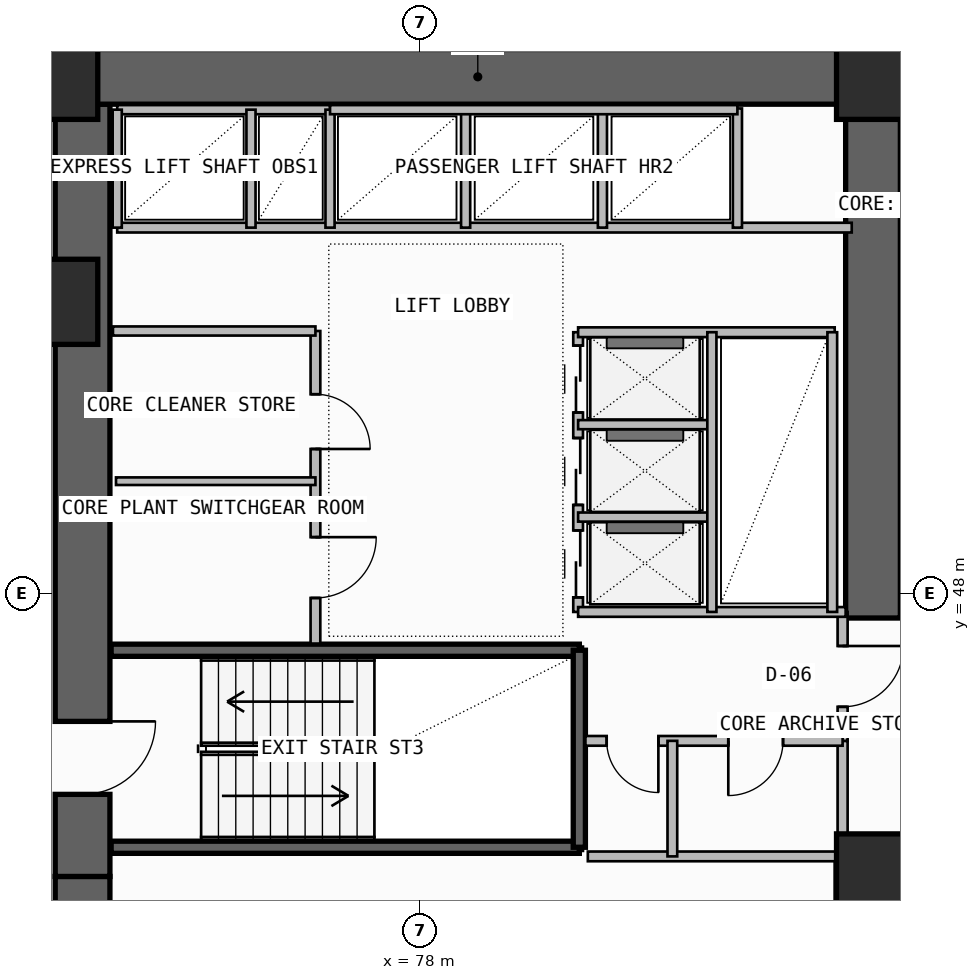
"""IFC4 building model, lengths in metres.
Left out: names, types, materials, properties, quantities, classifications, styles, units other than length and angle.
Written with IfcOpenShell. Run it as: python <this file> out.ifc"""

import sys

from ifc_helpers import new_model, si_unit, direction, frame, frame_2d, origin, origin_2d, place, context, subcontext, project, spatial, rectangle, extrude, element, fill, save


model = new_model("IFC4")
c1 = context("Model", 3, precision=1e-05, world=origin(), true_north=direction((0.0, 1.0)))
c2 = subcontext(c1, "Body", "Model", "MODEL_VIEW")
j1 = project(units=[si_unit("LENGTHUNIT", "METRE"), si_unit("PLANEANGLEUNIT", "RADIAN")], contexts=[c1])
p1 = place(None, origin())
s1 = spatial("IfcSite", under=j1, at=p1, CompositionType="ELEMENT")
p2 = place(p1, origin())
s2 = spatial("IfcBuilding", under=s1, at=p2, CompositionType="ELEMENT")
p3 = place(p2, frame((0.0, 0.0, 150.3)))
s3 = spatial("IfcBuildingStorey", under=s2, at=p3, CompositionType="ELEMENT", Elevation=150.3)
p4 = place(p3, frame((72.45, 35.5, -0.26), z_axis=(0.0, 0.0, 1.0), x_axis=(0.0, 1.0, 0.0)))
e1 = element("IfcWall", 1, at=p4, inside=s3, PredefinedType="SHEAR", context=c2, shape_type="SweptSolid", body=[
    extrude(rectangle(XDim=7.85, YDim=0.9, at=frame_2d((3.925, 0.0))), origin(), (0.0, 0.0, 1.0), 3.6),
])
p5 = place(p4, frame((1.45, 0.0, 0.26)))
e2 = element("IfcOpeningElement", 2, at=p5, cuts=e1, PredefinedType="OPENING", context=c2, shape_type="SweptSolid", body=[
    extrude(rectangle(XDim=1.2, YDim=2.2, at=frame_2d((0.6, 1.1))), frame((0.0, 0.46, 0.0), z_axis=(0.0, -1.0, 0.0), x_axis=(1.0, 0.0, 0.0)), (0.0, 0.0, 1.0), 0.92),
])
p6 = place(p3, frame((72.45, 43.35, -0.26), z_axis=(0.0, 0.0, 1.0), x_axis=(0.0, 1.0, 0.0)))
e3 = element("IfcWall", 3, at=p6, inside=s3, PredefinedType="SHEAR", context=c2, shape_type="SweptSolid", body=[
    extrude(rectangle(XDim=12.7, YDim=0.9, at=frame_2d((6.35, 0.0))), origin(), (0.0, 0.0, 1.0), 3.6),
])
p7 = place(p6, frame((1.35, 0.0, 0.26)))
e4 = element("IfcOpeningElement", 4, at=p7, cuts=e3, PredefinedType="OPENING", context=c2, shape_type="SweptSolid", body=[
    extrude(rectangle(XDim=1.2, YDim=2.2, at=frame_2d((0.6, 1.1))), frame((0.0, 0.46, 0.0), z_axis=(0.0, -1.0, 0.0), x_axis=(1.0, 0.0, 0.0)), (0.0, 0.0, 1.0), 0.92),
])
p8 = place(p3, frame((72.0, 56.5, -0.26), z_axis=(0.0, 0.0, 1.0), x_axis=(1.0, 0.0, 0.0)))
e5 = element("IfcWall", 5, at=p8, inside=s3, PredefinedType="SHEAR", context=c2, shape_type="SweptSolid", body=[
    extrude(rectangle(XDim=13.9, YDim=0.9, at=frame_2d((6.95, 0.0))), origin(), (0.0, 0.0, 1.0), 3.6),
])
p9 = place(p3, frame((85.45, 47.6, -0.26), z_axis=(0.0, 0.0, 1.0), x_axis=(0.0, 1.0, 0.0)))
e6 = element("IfcWall", 6, at=p9, inside=s3, PredefinedType="SHEAR", context=c2, shape_type="SweptSolid", body=[
    extrude(rectangle(XDim=8.45, YDim=0.9, at=frame_2d((4.225, 0.0))), origin(), (0.0, 0.0, 1.0), 3.6),
])
for number, where, z_axis, x_axis in (
    (7, (85.55, 43.35, 0.0), (0.0, 0.0, 1.0), (1.0, 0.0, 0.0)),
    (8, (72.0, 52.8, 0.0), (0.0, 0.0, 1.0), (1.0, 0.0, 0.0)),
    (9, (72.0, 56.5, 0.0), (0.0, 0.0, 1.0), (1.0, 0.0, 0.0)),
    (10, (85.55, 56.5, 0.0), (0.0, 0.0, 1.0), (1.0, 0.0, 0.0)),
):
    element("IfcColumn", number, at=place(p3, frame(where, z_axis=z_axis, x_axis=x_axis)), inside=s3, PredefinedType="COLUMN", context=c2, shape_type="SweptSolid", body=[
        extrude(rectangle(XDim=1.4, YDim=1.4, at=origin_2d()), origin(), (0.0, 0.0, 1.0), 3.6),
    ])
p10 = place(p3, frame((84.92, 38.85, 0.0), z_axis=(0.0, 0.0, 1.0), x_axis=(0.0, 1.0, 0.0)))
e11 = element("IfcWall", 11, at=p10, inside=s3, PredefinedType="SOLIDWALL", context=c2, shape_type="SweptSolid", body=[
    extrude(rectangle(XDim=4.83, YDim=0.2, at=frame_2d((2.415, 0.0))), origin(), (0.0, 0.0, 1.0), 3.34),
])
p11 = place(p10, frame((1.25, 0.0, 0.0)))
e12 = element("IfcOpeningElement", 12, at=p11, cuts=e11, PredefinedType="OPENING", context=c2, shape_type="SweptSolid", body=[
    extrude(rectangle(XDim=1.1, YDim=2.2, at=frame_2d((0.55, 1.1))), frame((0.0, 0.11, 0.0), z_axis=(0.0, -1.0, 0.0), x_axis=(1.0, 0.0, 0.0)), (0.0, 0.0, 1.0), 0.22),
])
for number, where, z_axis, x_axis in (
    (13, (72.92, 43.83, -0.26), (0.0, 0.0, 1.0), (1.0, 0.0, 0.0)),
    (14, (72.92, 47.07, -0.26), (0.0, 0.0, 1.0), (1.0, 0.0, 0.0)),
):
    element("IfcWall", number, at=place(p3, frame(where, z_axis=z_axis, x_axis=x_axis)), inside=s3, PredefinedType="SOLIDWALL", context=c2, shape_type="SweptSolid", body=[
        extrude(rectangle(XDim=7.7, YDim=0.2, at=frame_2d((3.85, 0.0))), origin(), (0.0, 0.0, 1.0), 3.6),
    ])
p12 = place(p3, frame((80.62, 43.83, -0.26), z_axis=(0.0, 0.0, 1.0), x_axis=(0.0, 1.0, 0.0)))
e15 = element("IfcWall", 15, at=p12, inside=s3, PredefinedType="SOLIDWALL", context=c2, shape_type="SweptSolid", body=[
    extrude(rectangle(XDim=3.24, YDim=0.2, at=frame_2d((1.62, 0.0))), origin(), (0.0, 0.0, 1.0), 3.6),
])
p13 = place(p3, frame((84.95, 43.68, 0.0), z_axis=(0.0, 0.0, 1.0), x_axis=(0.0, 1.0, 0.0)))
e16 = element("IfcWall", 16, at=p13, inside=s3, PredefinedType="PLUMBINGWALL", context=c2, shape_type="SweptSolid", body=[
    extrude(rectangle(XDim=1.9, YDim=0.165, at=frame_2d((0.95, 0.0))), origin(), (0.0, 0.0, 1.0), 3.34),
])
p14 = place(p3, frame((84.95, 45.58, 0.0), z_axis=(0.0, 0.0, 1.0), x_axis=(0.0, 1.0, 0.0)))
e17 = element("IfcWall", 17, at=p14, inside=s3, PredefinedType="PARTITIONING", context=c2, shape_type="SweptSolid", body=[
    extrude(rectangle(XDim=2.12, YDim=0.165, at=frame_2d((1.06, 0.0))), origin(), (0.0, 0.0, 1.0), 3.34),
])
p15 = place(p14, frame((0.56, 0.0, 0.0)))
e18 = element("IfcOpeningElement", 18, at=p15, cuts=e17, PredefinedType="OPENING", context=c2, shape_type="SweptSolid", body=[
    extrude(rectangle(XDim=1.0, YDim=2.2, at=frame_2d((0.5, 1.1))), frame((0.0, 0.093, 0.0), z_axis=(0.0, -1.0, 0.0), x_axis=(1.0, 0.0, 0.0)), (0.0, 0.0, 1.0), 0.185),
])
p16 = place(p3, frame((80.72, 45.58, 0.0), z_axis=(0.0, 0.0, 1.0), x_axis=(1.0, 0.0, 0.0)))
e19 = element("IfcWall", 19, at=p16, inside=s3, PredefinedType="PLUMBINGWALL", context=c2, shape_type="SweptSolid", body=[
    extrude(rectangle(XDim=4.23, YDim=0.16, at=frame_2d((2.115, 0.0))), origin(), (0.0, 0.0, 1.0), 3.34),
])
p17 = place(p16, frame((0.35, 0.0, 0.0)))
e20 = element("IfcOpeningElement", 20, at=p17, cuts=e19, PredefinedType="OPENING", context=c2, shape_type="SweptSolid", body=[
    extrude(rectangle(XDim=0.85, YDim=2.05, at=frame_2d((0.425, 1.025))), frame((0.0, 0.09, 0.0), z_axis=(0.0, -1.0, 0.0), x_axis=(1.0, 0.0, 0.0)), (0.0, 0.0, 1.0), 0.18),
])
p18 = place(p16, frame((2.35, 0.0, 0.0)))
e21 = element("IfcOpeningElement", 21, at=p18, cuts=e19, PredefinedType="OPENING", context=c2, shape_type="SweptSolid", body=[
    extrude(rectangle(XDim=0.9, YDim=2.1, at=frame_2d((0.45, 1.05))), frame((0.0, 0.09, 0.0), z_axis=(0.0, -1.0, 0.0), x_axis=(1.0, 0.0, 0.0)), (0.0, 0.0, 1.0), 0.18),
])
p19 = place(p3, frame((80.76, 43.68, 0.0), z_axis=(0.0, 0.0, 1.0), x_axis=(1.0, 0.0, 0.0)))
e22 = element("IfcWall", 22, at=p19, inside=s3, PredefinedType="PLUMBINGWALL", context=c2, shape_type="SweptSolid", body=[
    extrude(rectangle(XDim=4.19, YDim=0.16, at=frame_2d((2.095, 0.0))), origin(), (0.0, 0.0, 1.0), 3.34),
])
p20 = place(p3, frame((82.15, 43.68, 0.0), z_axis=(0.0, 0.0, 1.0), x_axis=(0.0, 1.0, 0.0)))
e23 = element("IfcWall", 23, at=p20, inside=s3, PredefinedType="PLUMBINGWALL", context=c2, shape_type="SweptSolid", body=[
    extrude(rectangle(XDim=1.9, YDim=0.16, at=frame_2d((0.95, 0.0))), origin(), (0.0, 0.0, 1.0), 3.34),
])
p21 = place(p3, frame((76.28, 47.18, 0.0), z_axis=(0.0, 0.0, 1.0), x_axis=(0.0, 1.0, 0.0)))
e24 = element("IfcWall", 24, at=p21, inside=s3, PredefinedType="SOLIDWALL", context=c2, shape_type="SweptSolid", body=[
    extrude(rectangle(XDim=5.14, YDim=0.16, at=frame_2d((2.57, 0.0))), origin(), (0.0, 0.0, 1.0), 3.34),
])
p22 = place(p21, frame((0.75, 0.0, 0.0)))
e25 = element("IfcOpeningElement", 25, at=p22, cuts=e24, PredefinedType="OPENING", context=c2, shape_type="SweptSolid", body=[
    extrude(rectangle(XDim=1.0, YDim=2.2, at=frame_2d((0.5, 1.1))), frame((0.0, 0.09, 0.0), z_axis=(0.0, -1.0, 0.0), x_axis=(1.0, 0.0, 0.0)), (0.0, 0.0, 1.0), 0.18),
])
p23 = place(p21, frame((3.2, 0.0, 0.0)))
e26 = element("IfcOpeningElement", 26, at=p23, cuts=e24, PredefinedType="OPENING", context=c2, shape_type="SweptSolid", body=[
    extrude(rectangle(XDim=0.9, YDim=2.1, at=frame_2d((0.45, 1.05))), frame((0.0, 0.09, 0.0), z_axis=(0.0, -1.0, 0.0), x_axis=(1.0, 0.0, 0.0)), (0.0, 0.0, 1.0), 0.18),
])
p24 = place(p3, frame((72.95, 52.32, 0.0), z_axis=(0.0, 0.0, 1.0), x_axis=(1.0, 0.0, 0.0)))
e27 = element("IfcWall", 27, at=p24, inside=s3, PredefinedType="SOLIDWALL", context=c2, shape_type="SweptSolid", body=[
    extrude(rectangle(XDim=3.33, YDim=0.15, at=frame_2d((1.665, 0.0))), origin(), (0.0, 0.0, 1.0), 3.34),
])
p25 = place(p3, frame((73.0, 49.85, 0.0), z_axis=(0.0, 0.0, 1.0), x_axis=(1.0, 0.0, 0.0)))
e28 = element("IfcWall", 28, at=p25, inside=s3, PredefinedType="PARTITIONING", context=c2, shape_type="SweptSolid", body=[
    extrude(rectangle(XDim=3.28, YDim=0.125, at=frame_2d((1.64, 0.0))), origin(), (0.0, 0.0, 1.0), 3.34),
])
p26 = place(p3, frame((80.6, 47.7, 0.0), z_axis=(0.0, 0.0, 1.0), x_axis=(0.0, 1.0, 0.0)))
e29 = element("IfcWall", 29, at=p26, inside=s3, PredefinedType="SOLIDWALL", context=c2, shape_type="SweptSolid", body=[
    extrude(rectangle(XDim=4.6, YDim=0.16, at=frame_2d((2.3, 0.0))), origin(), (0.0, 0.0, 1.0), 3.34),
])
p27 = place(p26, frame((0.24, 0.0, 0.0)))
e30 = element("IfcOpeningElement", 30, at=p27, cuts=e29, PredefinedType="OPENING", context=c2, shape_type="SweptSolid", body=[
    extrude(rectangle(XDim=1.1, YDim=2.25, at=frame_2d((0.55, 1.125))), frame((0.0, 0.09, 0.0), z_axis=(0.0, -1.0, 0.0), x_axis=(1.0, 0.0, 0.0)), (0.0, 0.0, 1.0), 0.18),
])
p28 = place(p26, frame((1.76, 0.0, 0.0)))
e31 = element("IfcOpeningElement", 31, at=p28, cuts=e29, PredefinedType="OPENING", context=c2, shape_type="SweptSolid", body=[
    extrude(rectangle(XDim=1.1, YDim=2.25, at=frame_2d((0.55, 1.125))), frame((0.0, 0.09, 0.0), z_axis=(0.0, -1.0, 0.0), x_axis=(1.0, 0.0, 0.0)), (0.0, 0.0, 1.0), 0.18),
])
p29 = place(p26, frame((3.28, 0.0, 0.0)))
e32 = element("IfcOpeningElement", 32, at=p29, cuts=e29, PredefinedType="OPENING", context=c2, shape_type="SweptSolid", body=[
    extrude(rectangle(XDim=1.1, YDim=2.25, at=frame_2d((0.55, 1.125))), frame((0.0, 0.09, 0.0), z_axis=(0.0, -1.0, 0.0), x_axis=(1.0, 0.0, 0.0)), (0.0, 0.0, 1.0), 0.18),
])
p30 = place(p3, frame((80.6, 47.7, 0.0), z_axis=(0.0, 0.0, 1.0), x_axis=(1.0, 0.0, 0.0)))
e33 = element("IfcWall", 33, at=p30, inside=s3, PredefinedType="SOLIDWALL", context=c2, shape_type="SweptSolid", body=[
    extrude(rectangle(XDim=4.4, YDim=0.16, at=frame_2d((2.2, 0.0))), origin(), (0.0, 0.0, 1.0), 3.34),
])
p31 = place(p3, frame((80.6, 52.3, 0.0), z_axis=(0.0, 0.0, 1.0), x_axis=(1.0, 0.0, 0.0)))
e34 = element("IfcWall", 34, at=p31, inside=s3, PredefinedType="SOLIDWALL", context=c2, shape_type="SweptSolid", body=[
    extrude(rectangle(XDim=4.22, YDim=0.16, at=frame_2d((2.11, 0.0))), origin(), (0.0, 0.0, 1.0), 3.34),
])
for number, where, z_axis, x_axis in (
    (35, (80.6, 49.26, 0.0), (0.0, 0.0, 1.0), (1.0, 0.0, 0.0)),
    (36, (80.6, 50.78, 0.0), (0.0, 0.0, 1.0), (1.0, 0.0, 0.0)),
):
    element("IfcWall", number, at=place(p3, frame(where, z_axis=z_axis, x_axis=x_axis)), inside=s3, PredefinedType="PLUMBINGWALL", context=c2, shape_type="SweptSolid", body=[
        extrude(rectangle(XDim=2.2, YDim=0.15, at=frame_2d((1.1, 0.0))), origin(), (0.0, 0.0, 1.0), 3.34),
    ])
p32 = place(p3, frame((82.8, 47.7, 0.0), z_axis=(0.0, 0.0, 1.0), x_axis=(0.0, 1.0, 0.0)))
e37 = element("IfcWall", 37, at=p32, inside=s3, PredefinedType="PLUMBINGWALL", context=c2, shape_type="SweptSolid", body=[
    extrude(rectangle(XDim=4.6, YDim=0.15, at=frame_2d((2.3, 0.0))), origin(), (0.0, 0.0, 1.0), 3.34),
])
p33 = place(p3, frame((84.78, 47.7, 0.0), z_axis=(0.0, 0.0, 1.0), x_axis=(0.0, 1.0, 0.0)))
e38 = element("IfcWall", 38, at=p33, inside=s3, PredefinedType="SOLIDWALL", context=c2, shape_type="SweptSolid", body=[
    extrude(rectangle(XDim=4.6, YDim=0.16, at=frame_2d((2.3, 0.0))), origin(), (0.0, 0.0, 1.0), 3.34),
])
p34 = place(p3, frame((73.02, 54.02, 0.0), z_axis=(0.0, 0.0, 1.0), x_axis=(1.0, 0.0, 0.0)))
e39 = element("IfcWall", 39, at=p34, inside=s3, PredefinedType="SOLIDWALL", context=c2, shape_type="SweptSolid", body=[
    extrude(rectangle(XDim=12.08, YDim=0.16, at=frame_2d((6.04, 0.0))), origin(), (0.0, 0.0, 1.0), 3.34),
])
p35 = place(p3, frame((73.02, 55.96, 0.0), z_axis=(0.0, 0.0, 1.0), x_axis=(1.0, 0.0, 0.0)))
e40 = element("IfcWall", 40, at=p35, inside=s3, PredefinedType="SOLIDWALL", context=c2, shape_type="SweptSolid", body=[
    extrude(rectangle(XDim=3.5, YDim=0.15, at=frame_2d((1.75, 0.0))), origin(), (0.0, 0.0, 1.0), 3.34),
])
p36 = place(p3, frame((73.02, 54.02, 0.0), z_axis=(0.0, 0.0, 1.0), x_axis=(0.0, 1.0, 0.0)))
e41 = element("IfcWall", 41, at=p36, inside=s3, PredefinedType="PLUMBINGWALL", context=c2, shape_type="SweptSolid", body=[
    extrude(rectangle(XDim=1.94, YDim=0.15, at=frame_2d((0.97, 0.0))), origin(), (0.0, 0.0, 1.0), 3.34),
])
p37 = place(p3, frame((76.52, 54.02, 0.0), z_axis=(0.0, 0.0, 1.0), x_axis=(0.0, 1.0, 0.0)))
e42 = element("IfcWall", 42, at=p37, inside=s3, PredefinedType="SOLIDWALL", context=c2, shape_type="SweptSolid", body=[
    extrude(rectangle(XDim=1.94, YDim=0.15, at=frame_2d((0.97, 0.0))), origin(), (0.0, 0.0, 1.0), 3.34),
])
p38 = place(p3, frame((75.22, 54.02, 0.0), z_axis=(0.0, 0.0, 1.0), x_axis=(0.0, 1.0, 0.0)))
e43 = element("IfcWall", 43, at=p38, inside=s3, PredefinedType="PLUMBINGWALL", context=c2, shape_type="SweptSolid", body=[
    extrude(rectangle(XDim=1.94, YDim=0.15, at=frame_2d((0.97, 0.0))), origin(), (0.0, 0.0, 1.0), 3.34),
])
for number, where, z_axis, x_axis in (
    (44, (78.75, 54.02, 0.0), (0.0, 0.0, 1.0), (0.0, 1.0, 0.0)),
    (45, (81.0, 54.02, 0.0), (0.0, 0.0, 1.0), (0.0, 1.0, 0.0)),
):
    element("IfcWall", number, at=place(p3, frame(where, z_axis=z_axis, x_axis=x_axis)), inside=s3, PredefinedType="PLUMBINGWALL", context=c2, shape_type="SweptSolid", body=[
        extrude(rectangle(XDim=1.96, YDim=0.15, at=frame_2d((0.98, 0.0))), origin(), (0.0, 0.0, 1.0), 3.34),
    ])
p39 = place(p3, frame((83.22, 54.02, 0.0), z_axis=(0.0, 0.0, 1.0), x_axis=(0.0, 1.0, 0.0)))
e46 = element("IfcWall", 46, at=p39, inside=s3, PredefinedType="SOLIDWALL", context=c2, shape_type="SweptSolid", body=[
    extrude(rectangle(XDim=1.96, YDim=0.15, at=frame_2d((0.98, 0.0))), origin(), (0.0, 0.0, 1.0), 3.34),
])
p40 = place(p3, frame((76.52, 55.96, 0.0), z_axis=(0.0, 0.0, 1.0), x_axis=(1.0, 0.0, 0.0)))
e47 = element("IfcWall", 47, at=p40, inside=s3, PredefinedType="SOLIDWALL", context=c2, shape_type="SweptSolid", body=[
    extrude(rectangle(XDim=6.7, YDim=0.15, at=frame_2d((3.35, 0.0))), origin(), (0.0, 0.0, 1.0), 3.34),
])
p41 = place(p7, frame((1.2, 0.0, 0.0), z_axis=(0.0, 0.0, 1.0), x_axis=(-1.0, 0.0, 0.0)))
e48 = element("IfcDoor", 48, at=p41, inside=s3, OperationType="SINGLE_SWING_LEFT", PredefinedType="USERDEFINED", context=c2, shape_type="SweptSolid", body=[
    extrude(rectangle(XDim=1.2, YDim=2.2, at=frame_2d((0.6, 1.1))), frame((0.0, 0.025, 0.0), z_axis=(0.0, -1.0, 0.0), x_axis=(1.0, 0.0, 0.0)), (0.0, 0.0, 1.0), 0.05),
])
fill(e4, e48)
p42 = place(p15, frame((1.0, 0.0, 0.0), z_axis=(0.0, 0.0, 1.0), x_axis=(-1.0, 0.0, 0.0)))
e49 = element("IfcDoor", 49, at=p42, inside=s3, OperationType="SINGLE_SWING_LEFT", PredefinedType="DOOR", context=c2, shape_type="SweptSolid", body=[
    extrude(rectangle(XDim=1.0, YDim=2.2, at=frame_2d((0.5, 1.1))), frame((0.0, 0.025, 0.0), z_axis=(0.0, -1.0, 0.0), x_axis=(1.0, 0.0, 0.0)), (0.0, 0.0, 1.0), 0.05),
])
fill(e18, e49)
p43 = place(p17, frame((0.85, 0.0, 0.0), z_axis=(0.0, 0.0, 1.0), x_axis=(-1.0, 0.0, 0.0)))
e50 = element("IfcDoor", 50, at=p43, inside=s3, OperationType="SINGLE_SWING_LEFT", PredefinedType="DOOR", context=c2, shape_type="SweptSolid", body=[
    extrude(rectangle(XDim=0.85, YDim=2.05, at=frame_2d((0.425, 1.025))), frame((0.0, 0.025, 0.0), z_axis=(0.0, -1.0, 0.0), x_axis=(1.0, 0.0, 0.0)), (0.0, 0.0, 1.0), 0.05),
])
fill(e20, e50)
p44 = place(p18, frame((0.9, 0.0, 0.0), z_axis=(0.0, 0.0, 1.0), x_axis=(-1.0, 0.0, 0.0)))
e51 = element("IfcDoor", 51, at=p44, inside=s3, OperationType="SINGLE_SWING_RIGHT", PredefinedType="DOOR", context=c2, shape_type="SweptSolid", body=[
    extrude(rectangle(XDim=0.9, YDim=2.1, at=frame_2d((0.45, 1.05))), frame((0.0, 0.025, 0.0), z_axis=(0.0, -1.0, 0.0), x_axis=(1.0, 0.0, 0.0)), (0.0, 0.0, 1.0), 0.05),
])
fill(e21, e51)
p45 = place(p22, frame((1.0, 0.0, 0.0), z_axis=(0.0, 0.0, 1.0), x_axis=(-1.0, 0.0, 0.0)))
e52 = element("IfcDoor", 52, at=p45, inside=s3, OperationType="SINGLE_SWING_LEFT", PredefinedType="DOOR", context=c2, shape_type="SweptSolid", body=[
    extrude(rectangle(XDim=1.0, YDim=2.2, at=frame_2d((0.5, 1.1))), frame((0.0, 0.025, 0.0), z_axis=(0.0, -1.0, 0.0), x_axis=(1.0, 0.0, 0.0)), (0.0, 0.0, 1.0), 0.05),
])
fill(e25, e52)
p46 = place(p23, frame((0.9, 0.0, 0.0), z_axis=(0.0, 0.0, 1.0), x_axis=(-1.0, 0.0, 0.0)))
e53 = element("IfcDoor", 53, at=p46, inside=s3, OperationType="SINGLE_SWING_RIGHT", PredefinedType="DOOR", context=c2, shape_type="SweptSolid", body=[
    extrude(rectangle(XDim=0.9, YDim=2.1, at=frame_2d((0.45, 1.05))), frame((0.0, 0.025, 0.0), z_axis=(0.0, -1.0, 0.0), x_axis=(1.0, 0.0, 0.0)), (0.0, 0.0, 1.0), 0.05),
])
fill(e26, e53)
p47 = place(p27, frame((1.1, 0.0, 0.0), z_axis=(0.0, 0.0, 1.0), x_axis=(-1.0, 0.0, 0.0)))
e54 = element("IfcDoor", 54, at=p47, inside=s3, OperationType="DOUBLE_DOOR_SLIDING", PredefinedType="DOOR", context=c2, shape_type="SweptSolid", body=[
    extrude(rectangle(XDim=1.1, YDim=2.25, at=frame_2d((0.55, 1.125))), frame((0.0, 0.025, 0.0), z_axis=(0.0, -1.0, 0.0), x_axis=(1.0, 0.0, 0.0)), (0.0, 0.0, 1.0), 0.05),
])
fill(e30, e54)
p48 = place(p28, frame((1.1, 0.0, 0.0), z_axis=(0.0, 0.0, 1.0), x_axis=(-1.0, 0.0, 0.0)))
e55 = element("IfcDoor", 55, at=p48, inside=s3, OperationType="DOUBLE_DOOR_SLIDING", PredefinedType="DOOR", context=c2, shape_type="SweptSolid", body=[
    extrude(rectangle(XDim=1.1, YDim=2.25, at=frame_2d((0.55, 1.125))), frame((0.0, 0.025, 0.0), z_axis=(0.0, -1.0, 0.0), x_axis=(1.0, 0.0, 0.0)), (0.0, 0.0, 1.0), 0.05),
])
fill(e31, e55)
p49 = place(p29, frame((1.1, 0.0, 0.0), z_axis=(0.0, 0.0, 1.0), x_axis=(-1.0, 0.0, 0.0)))
e56 = element("IfcDoor", 56, at=p49, inside=s3, OperationType="DOUBLE_DOOR_SLIDING", PredefinedType="DOOR", context=c2, shape_type="SweptSolid", body=[
    extrude(rectangle(XDim=1.1, YDim=2.25, at=frame_2d((0.55, 1.125))), frame((0.0, 0.025, 0.0), z_axis=(0.0, -1.0, 0.0), x_axis=(1.0, 0.0, 0.0)), (0.0, 0.0, 1.0), 0.05),
])
fill(e32, e56)
save(model, sys.argv[1])
